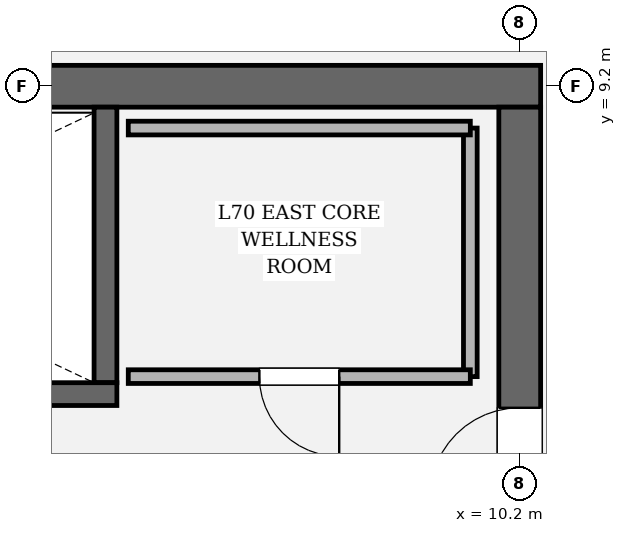
"""IFC4 building model, lengths in metres.
Left out: names, types, materials, properties, quantities, classifications, styles, units other than length and angle.
Written with IfcOpenShell. Run it as: python <this file> out.ifc"""

import sys

from ifc_helpers import new_model, si_unit, direction, frame, frame_2d, origin, place, context, subcontext, project, spatial, rectangle, extrude, element, fill, save


model = new_model("IFC4")
c1 = context("Model", 3, precision=1e-05, world=origin(), true_north=direction((0.0, 1.0)))
c2 = subcontext(c1, "Body", "Model", "MODEL_VIEW")
j1 = project(units=[si_unit("LENGTHUNIT", "METRE"), si_unit("PLANEANGLEUNIT", "RADIAN")], contexts=[c1])
p1 = place(None, origin())
s1 = spatial("IfcSite", under=j1, at=p1, CompositionType="ELEMENT")
p2 = place(p1, origin())
s2 = spatial("IfcBuilding", under=s1, at=p2, CompositionType="ELEMENT")
p3 = place(p2, frame((0.0, 0.0, 296.4)))
s3 = spatial("IfcBuildingStorey", under=s2, at=p3, CompositionType="ELEMENT", Elevation=296.4)
p4 = place(p3, frame((-10.475, 9.2, 0.0), z_axis=(0.0, 0.0, 1.0), x_axis=(1.0, 0.0, 0.0)))
e1 = element("IfcWall", 1, at=p4, inside=s3, PredefinedType="SHEAR", context=c2, shape_type="SweptSolid", body=[
    extrude(rectangle(XDim=20.95, YDim=0.55, at=frame_2d((10.475, 0.0))), origin(), (0.0, 0.0, 1.0), 4.2),
])
p5 = place(p3, frame((10.2, 8.925, 0.0), z_axis=(0.0, 0.0, 1.0), x_axis=(0.0, -1.0, 0.0)))
e2 = element("IfcWall", 2, at=p5, inside=s3, PredefinedType="SHEAR", context=c2, shape_type="SweptSolid", body=[
    extrude(rectangle(XDim=17.85, YDim=0.55, at=frame_2d((8.925, 0.0))), origin(), (0.0, 0.0, 1.0), 4.2),
])
p6 = place(p5, frame((3.955, 0.0, 0.0)))
e3 = element("IfcOpeningElement", 3, at=p6, cuts=e2, PredefinedType="OPENING", context=c2, shape_type="SweptSolid", body=[
    extrude(rectangle(XDim=1.18, YDim=2.2, at=frame_2d((0.59, 1.1))), frame((0.0, 0.285, 0.0), z_axis=(0.0, -1.0, 0.0), x_axis=(1.0, 0.0, 0.0)), (0.0, 0.0, 1.0), 0.57),
])
p7 = place(p3, frame((4.75, 8.925, 0.0), z_axis=(0.0, 0.0, 1.0), x_axis=(0.0, -1.0, 0.0)))
e4 = element("IfcWall", 4, at=p7, inside=s3, PredefinedType="SOLIDWALL", context=c2, shape_type="SweptSolid", body=[
    extrude(rectangle(XDim=3.625, YDim=0.3, at=frame_2d((1.812, 0.0))), origin(), (0.0, 0.0, 1.0), 4.2),
])
p8 = place(p3, frame((-4.9, 5.15, 0.0), z_axis=(0.0, 0.0, 1.0), x_axis=(1.0, 0.0, 0.0)))
e5 = element("IfcWall", 5, at=p8, inside=s3, PredefinedType="SOLIDWALL", context=c2, shape_type="SweptSolid", body=[
    extrude(rectangle(XDim=9.8, YDim=0.3, at=frame_2d((4.9, 0.0))), origin(), (0.0, 0.0, 1.0), 4.2),
])
p9 = place(p8, frame((0.56, 0.0, 0.0)))
e6 = element("IfcOpeningElement", 6, at=p9, cuts=e5, PredefinedType="OPENING", context=c2, shape_type="SweptSolid", body=[
    extrude(rectangle(XDim=1.18, YDim=2.2, at=frame_2d((0.59, 1.1))), frame((0.0, 0.16, 0.0), z_axis=(0.0, -1.0, 0.0), x_axis=(1.0, 0.0, 0.0)), (0.0, 0.0, 1.0), 0.32),
])
p10 = place(p3, frame((9.55, 5.38, 0.0), z_axis=(0.0, 0.0, 1.0), x_axis=(0.0, 1.0, 0.0)))
e7 = element("IfcWall", 7, at=p10, inside=s3, PredefinedType="PARTITIONING", context=c2, shape_type="SweptSolid", body=[
    extrude(rectangle(XDim=3.27, YDim=0.18, at=frame_2d((1.635, 0.0))), origin(), (0.0, 0.0, 1.0), 4.0),
])
p11 = place(p3, frame((9.55, 8.65, 0.0), z_axis=(0.0, 0.0, 1.0), x_axis=(-1.0, 0.0, 0.0)))
e8 = element("IfcWall", 8, at=p11, inside=s3, PredefinedType="PARTITIONING", context=c2, shape_type="SweptSolid", body=[
    extrude(rectangle(XDim=4.5, YDim=0.18, at=frame_2d((2.25, 0.0))), origin(), (0.0, 0.0, 1.0), 4.0),
])
p12 = place(p3, frame((5.05, 5.38, 0.0), z_axis=(0.0, 0.0, 1.0), x_axis=(1.0, 0.0, 0.0)))
e9 = element("IfcWall", 9, at=p12, inside=s3, PredefinedType="PARTITIONING", context=c2, shape_type="SweptSolid", body=[
    extrude(rectangle(XDim=4.5, YDim=0.18, at=frame_2d((2.25, 0.0))), origin(), (0.0, 0.0, 1.0), 4.0),
])
p13 = place(p12, frame((1.725, 0.0, 0.0)))
e10 = element("IfcOpeningElement", 10, at=p13, cuts=e9, PredefinedType="OPENING", context=c2, shape_type="SweptSolid", body=[
    extrude(rectangle(XDim=1.05, YDim=2.2, at=frame_2d((0.525, 1.1))), frame((0.0, 0.1, 0.0), z_axis=(0.0, -1.0, 0.0), x_axis=(1.0, 0.0, 0.0)), (0.0, 0.0, 1.0), 0.2),
])
p14 = place(p6, origin())
e11 = element("IfcDoor", 11, at=p14, inside=s3, OperationType="SINGLE_SWING_RIGHT", PredefinedType="DOOR", context=c2, shape_type="SweptSolid", body=[
    extrude(rectangle(XDim=1.18, YDim=2.2, at=frame_2d((0.59, 1.1))), frame((0.0, 0.025, 0.0), z_axis=(0.0, -1.0, 0.0), x_axis=(1.0, 0.0, 0.0)), (0.0, 0.0, 1.0), 0.05),
])
fill(e3, e11)
p15 = place(p13, origin())
e12 = element("IfcDoor", 12, at=p15, inside=s3, OperationType="SINGLE_SWING_RIGHT", PredefinedType="DOOR", context=c2, shape_type="SweptSolid", body=[
    extrude(rectangle(XDim=1.05, YDim=2.2, at=frame_2d((0.525, 1.1))), frame((0.0, 0.025, 0.0), z_axis=(0.0, -1.0, 0.0), x_axis=(1.0, 0.0, 0.0)), (0.0, 0.0, 1.0), 0.05),
])
fill(e10, e12)
save(model, sys.argv[1])
